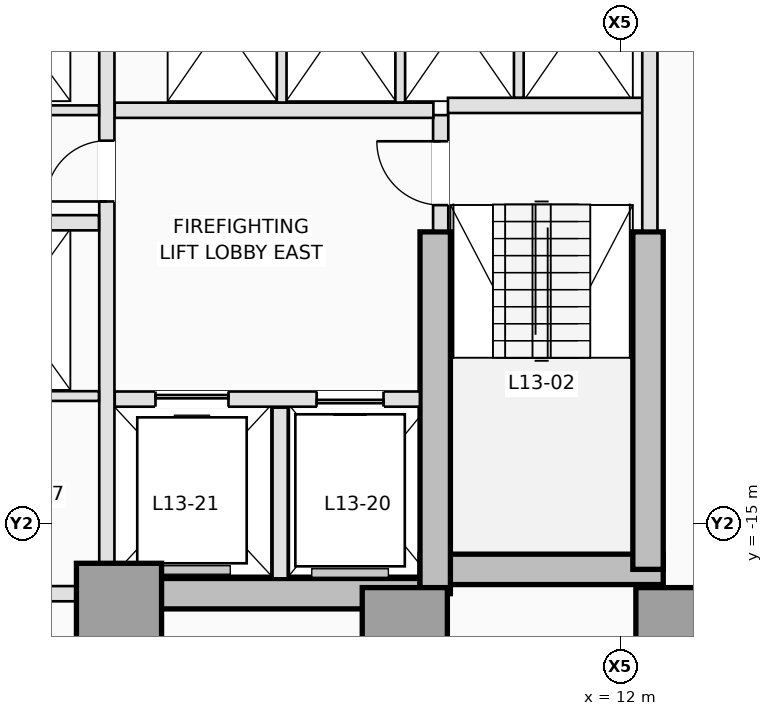
"""IFC4 building model, lengths in metres.
Left out: names, types, materials, properties, quantities, classifications, styles, units other than length and angle.
Written with IfcOpenShell. Run it as: python <this file> out.ifc"""

import sys

from ifc_helpers import new_model, si_unit, direction, frame, frame_2d, origin, origin_2d, place, context, subcontext, project, spatial, rectangle, extrude, element, fill, save


model = new_model("IFC4")
c1 = context("Model", 3, precision=1e-05, world=origin(), true_north=direction((0.0, 1.0)))
c2 = subcontext(c1, "Body", "Model", "MODEL_VIEW")
j1 = project(units=[si_unit("LENGTHUNIT", "METRE"), si_unit("PLANEANGLEUNIT", "RADIAN")], contexts=[c1])
p1 = place(None, origin())
s1 = spatial("IfcSite", under=j1, at=p1, CompositionType="ELEMENT")
p2 = place(p1, origin())
s2 = spatial("IfcBuilding", under=s1, at=p2, CompositionType="ELEMENT")
p3 = place(p2, frame((0.0, 0.0, 52.1)))
s3 = spatial("IfcBuildingStorey", under=s2, at=p3, CompositionType="ELEMENT", Elevation=52.1)
p4 = place(p3, frame((3.75, -16.15, 0.0), z_axis=(0.0, 0.0, 1.0), x_axis=(1.0, 0.0, 0.0)))
e1 = element("IfcWall", 1, at=p4, inside=s3, PredefinedType="SHEAR", context=c2, shape_type="SweptSolid", body=[
    extrude(rectangle(XDim=5.2, YDim=0.5, at=frame_2d((2.6, 0.0))), origin(), (0.0, 0.0, 1.0), 3.5),
])
p5 = place(p3, frame((8.7, -15.75, 0.0), z_axis=(0.0, 0.0, 1.0), x_axis=(1.0, 0.0, 0.0)))
e2 = element("IfcWall", 2, at=p5, inside=s3, PredefinedType="SHEAR", context=c2, shape_type="SweptSolid", body=[
    extrude(rectangle(XDim=4.0, YDim=0.5, at=frame_2d((2.0, 0.0))), origin(), (0.0, 0.0, 1.0), 3.5),
])
p6 = place(p3, frame((12.45, -15.75, 0.0), z_axis=(0.0, 0.0, 1.0), x_axis=(0.0, 1.0, 0.0)))
e3 = element("IfcWall", 3, at=p6, inside=s3, PredefinedType="SHEAR", context=c2, shape_type="SweptSolid", body=[
    extrude(rectangle(XDim=5.55, YDim=0.5, at=frame_2d((2.775, 0.0))), origin(), (0.0, 0.0, 1.0), 3.5),
])
p7 = place(p3, frame((8.95, -16.15, 0.0), z_axis=(0.0, 0.0, 1.0), x_axis=(0.0, 1.0, 0.0)))
e4 = element("IfcWall", 4, at=p7, inside=s3, PredefinedType="SHEAR", context=c2, shape_type="SweptSolid", body=[
    extrude(rectangle(XDim=5.95, YDim=0.5, at=frame_2d((2.975, 0.0))), origin(), (0.0, 0.0, 1.0), 3.5),
])
for number, where, z_axis, x_axis in (
    (5, (3.75, -16.35, 0.0), (0.0, 0.0, 1.0), (1.0, 0.0, 0.0)),
    (6, (8.45, -16.75, 0.0), (0.0, 0.0, 1.0), (1.0, 0.0, 0.0)),
    (7, (12.95, -16.75, 0.0), (0.0, 0.0, 1.0), (1.0, 0.0, 0.0)),
):
    element("IfcColumn", number, at=place(p3, frame(where, z_axis=z_axis, x_axis=x_axis)), inside=s3, PredefinedType="COLUMN", context=c2, shape_type="SweptSolid", body=[
        extrude(rectangle(XDim=1.4, YDim=1.4, at=origin_2d()), origin(), (0.0, 0.0, 1.0), 3.5),
    ])
p8 = place(p3, frame((9.04, -10.18, 0.0), z_axis=(0.0, 0.0, 1.0), x_axis=(0.0, 1.0, 0.0)))
e8 = element("IfcWall", 8, at=p8, inside=s3, PredefinedType="PARTITIONING", context=c2, shape_type="SweptSolid", body=[
    extrude(rectangle(XDim=1.9, YDim=0.25, at=frame_2d((0.95, 0.0))), origin(), (0.0, 0.0, 1.0), 3.25),
])
p9 = place(p8, frame((0.42, 0.0, 0.0)))
e9 = element("IfcOpeningElement", 9, at=p9, cuts=e8, PredefinedType="OPENING", context=c2, shape_type="SweptSolid", body=[
    extrude(rectangle(XDim=1.05, YDim=2.15, at=frame_2d((0.525, 1.075))), frame((0.0, 0.135, 0.0), z_axis=(0.0, -1.0, 0.0), x_axis=(1.0, 0.0, 0.0)), (0.0, 0.0, 1.0), 0.27),
])
p10 = place(p3, frame((9.16, -8.12, 0.0), z_axis=(0.0, 0.0, 1.0), x_axis=(1.0, 0.0, 0.0)))
e10 = element("IfcWall", 10, at=p10, inside=s3, PredefinedType="PARTITIONING", context=c2, shape_type="SweptSolid", body=[
    extrude(rectangle(XDim=3.22, YDim=0.25, at=frame_2d((1.61, 0.0))), origin(), (0.0, 0.0, 1.0), 3.25),
])
p11 = place(p3, frame((12.48, -10.18, 0.0), z_axis=(0.0, 0.0, 1.0), x_axis=(0.0, 1.0, 0.0)))
e11 = element("IfcWall", 11, at=p11, inside=s3, PredefinedType="PARTITIONING", context=c2, shape_type="SweptSolid", body=[
    extrude(rectangle(XDim=4.678, YDim=0.25, at=frame_2d((2.339, 0.0))), origin(), (0.0, 0.0, 1.0), 3.25),
])
p12 = place(p3, frame((3.68, -12.95, 0.0), z_axis=(0.0, 0.0, 1.0), x_axis=(1.0, 0.0, 0.0)))
e12 = element("IfcWall", 12, at=p12, inside=s3, PredefinedType="PARTITIONING", context=c2, shape_type="SweptSolid", body=[
    extrude(rectangle(XDim=5.018, YDim=0.25, at=frame_2d((2.509, 0.0))), origin(), (0.0, 0.0, 1.0), 3.25),
])
p13 = place(p12, frame((3.32, 0.0, 0.0)))
e13 = element("IfcOpeningElement", 13, at=p13, cuts=e12, PredefinedType="OPENING", context=c2, shape_type="SweptSolid", body=[
    extrude(rectangle(XDim=1.1, YDim=2.15, at=frame_2d((0.55, 1.075))), frame((0.0, 0.135, 0.0), z_axis=(0.0, -1.0, 0.0), x_axis=(1.0, 0.0, 0.0)), (0.0, 0.0, 1.0), 0.27),
])
p14 = place(p12, frame((0.67, 0.0, 0.0)))
e14 = element("IfcOpeningElement", 14, at=p14, cuts=e12, PredefinedType="OPENING", context=c2, shape_type="SweptSolid", body=[
    extrude(rectangle(XDim=1.2, YDim=2.15, at=frame_2d((0.6, 1.075))), frame((0.0, 0.135, 0.0), z_axis=(0.0, -1.0, 0.0), x_axis=(1.0, 0.0, 0.0)), (0.0, 0.0, 1.0), 0.27),
])
p15 = place(p3, frame((6.4, -15.898, 0.0), z_axis=(0.0, 0.0, 1.0), x_axis=(0.0, 1.0, 0.0)))
e15 = element("IfcWall", 15, at=p15, inside=s3, PredefinedType="PARTITIONING", context=c2, shape_type="SweptSolid", body=[
    extrude(rectangle(XDim=2.808, YDim=0.25, at=frame_2d((1.404, 0.0))), origin(), (0.0, 0.0, 1.0), 3.25),
])
p16 = place(p3, frame((3.68, -8.2, 0.0), z_axis=(0.0, 0.0, 1.0), x_axis=(1.0, 0.0, 0.0)))
e16 = element("IfcWall", 16, at=p16, inside=s3, PredefinedType="PARTITIONING", context=c2, shape_type="SweptSolid", body=[
    extrude(rectangle(XDim=5.24, YDim=0.25, at=frame_2d((2.62, 0.0))), origin(), (0.0, 0.0, 1.0), 3.25),
])
p17 = place(p3, frame((3.55, -15.648, 0.0), z_axis=(0.0, 0.0, 1.0), x_axis=(0.0, 1.0, 0.0)))
e17 = element("IfcWall", 17, at=p17, inside=s3, PredefinedType="PARTITIONING", context=c2, shape_type="SweptSolid", body=[
    extrude(rectangle(XDim=10.146, YDim=0.25, at=frame_2d((5.073, 0.0))), origin(), (0.0, 0.0, 1.0), 3.25),
])
p18 = place(p17, frame((5.948, 0.0, 0.0)))
e18 = element("IfcOpeningElement", 18, at=p18, cuts=e17, PredefinedType="OPENING", context=c2, shape_type="SweptSolid", body=[
    extrude(rectangle(XDim=1.0, YDim=2.15, at=frame_2d((0.5, 1.075))), frame((0.0, 0.135, 0.0), z_axis=(0.0, -1.0, 0.0), x_axis=(1.0, 0.0, 0.0)), (0.0, 0.0, 1.0), 0.27),
])
for number, where, z_axis, x_axis in (
    (19, (6.425, -8.073, 0.0), (0.0, 0.0, 1.0), (0.0, 1.0, 0.0)),
    (20, (8.375, -8.073, 0.0), (0.0, 0.0, 1.0), (0.0, 1.0, 0.0)),
):
    element("IfcWall", number, at=place(p3, frame(where, z_axis=z_axis, x_axis=x_axis)), inside=s3, PredefinedType="PARTITIONING", context=c2, shape_type="SweptSolid", body=[
        extrude(rectangle(XDim=2.733, YDim=0.16, at=frame_2d((1.366, 0.0))), origin(), (0.0, 0.0, 1.0), 3.25),
    ])
p19 = place(p3, frame((10.325, -7.993, 0.0), z_axis=(0.0, 0.0, 1.0), x_axis=(0.0, 1.0, 0.0)))
e21 = element("IfcWall", 21, at=p19, inside=s3, PredefinedType="PARTITIONING", context=c2, shape_type="SweptSolid", body=[
    extrude(rectangle(XDim=2.653, YDim=0.16, at=frame_2d((1.326, 0.0))), origin(), (0.0, 0.0, 1.0), 3.25),
])
p20 = place(p3, frame((-3.048, -16.15, 0.0), z_axis=(0.0, 0.0, 1.0), x_axis=(1.0, 0.0, 0.0)))
e22 = element("IfcWall", 22, at=p20, inside=s3, PredefinedType="PARTITIONING", context=c2, shape_type="SweptSolid", body=[
    extrude(rectangle(XDim=6.096, YDim=0.25, at=frame_2d((3.048, 0.0))), origin(), (0.0, 0.0, 1.0), 2.3),
])
p21 = place(p3, frame((0.95, -8.2, 0.0), z_axis=(0.0, 0.0, 1.0), x_axis=(1.0, 0.0, 0.0)))
e23 = element("IfcWall", 23, at=p21, inside=s3, PredefinedType="PARTITIONING", context=c2, shape_type="SweptSolid", body=[
    extrude(rectangle(XDim=2.47, YDim=0.16, at=frame_2d((1.235, 0.0))), origin(), (0.0, 0.0, 1.0), 3.25),
])
p22 = place(p3, frame((0.95, -10.05, 0.0), z_axis=(0.0, 0.0, 1.0), x_axis=(1.0, 0.0, 0.0)))
e24 = element("IfcWall", 24, at=p22, inside=s3, PredefinedType="PARTITIONING", context=c2, shape_type="SweptSolid", body=[
    extrude(rectangle(XDim=2.47, YDim=0.25, at=frame_2d((1.235, 0.0))), origin(), (0.0, 0.0, 1.0), 3.25),
])
p23 = place(p3, frame((-3.42, -12.9, 0.0), z_axis=(0.0, 0.0, 1.0), x_axis=(1.0, 0.0, 0.0)))
e25 = element("IfcWall", 25, at=p23, inside=s3, PredefinedType="PARTITIONING", context=c2, shape_type="SweptSolid", body=[
    extrude(rectangle(XDim=6.84, YDim=0.16, at=frame_2d((3.42, 0.0))), origin(), (0.0, 0.0, 1.0), 3.25),
])
p24 = place(p23, frame((2.98, 0.0, 0.0)))
e26 = element("IfcOpeningElement", 26, at=p24, cuts=e25, PredefinedType="OPENING", context=c2, shape_type="SweptSolid", body=[
    extrude(rectangle(XDim=0.88, YDim=2.12, at=frame_2d((0.44, 1.06))), frame((0.0, 0.09, 0.0), z_axis=(0.0, -1.0, 0.0), x_axis=(1.0, 0.0, 0.0)), (0.0, 0.0, 1.0), 0.18),
])
p25 = place(p13, origin())
e27 = element("IfcDoor", 27, at=p25, inside=s3, OperationType="SLIDING_TO_RIGHT", PredefinedType="DOOR", context=c2, shape_type="SweptSolid", body=[
    extrude(rectangle(XDim=1.1, YDim=2.15, at=frame_2d((0.55, 1.075))), frame((0.0, 0.025, 0.0), z_axis=(0.0, -1.0, 0.0), x_axis=(1.0, 0.0, 0.0)), (0.0, 0.0, 1.0), 0.05),
])
fill(e13, e27)
p26 = place(p14, origin())
e28 = element("IfcDoor", 28, at=p26, inside=s3, OperationType="SLIDING_TO_LEFT", PredefinedType="DOOR", context=c2, shape_type="SweptSolid", body=[
    extrude(rectangle(XDim=1.2, YDim=2.15, at=frame_2d((0.6, 1.075))), frame((0.0, 0.025, 0.0), z_axis=(0.0, -1.0, 0.0), x_axis=(1.0, 0.0, 0.0)), (0.0, 0.0, 1.0), 0.05),
])
fill(e14, e28)
p27 = place(p9, origin())
e29 = element("IfcDoor", 29, at=p27, inside=s3, OperationType="SINGLE_SWING_RIGHT", PredefinedType="DOOR", context=c2, shape_type="SweptSolid", body=[
    extrude(rectangle(XDim=1.05, YDim=2.15, at=frame_2d((0.525, 1.075))), frame((0.0, 0.025, 0.0), z_axis=(0.0, -1.0, 0.0), x_axis=(1.0, 0.0, 0.0)), (0.0, 0.0, 1.0), 0.05),
])
fill(e9, e29)
p28 = place(p18, origin())
e30 = element("IfcDoor", 30, at=p28, inside=s3, OperationType="SINGLE_SWING_LEFT", PredefinedType="DOOR", context=c2, shape_type="SweptSolid", body=[
    extrude(rectangle(XDim=1.0, YDim=2.15, at=frame_2d((0.5, 1.075))), frame((0.0, 0.025, 0.0), z_axis=(0.0, -1.0, 0.0), x_axis=(1.0, 0.0, 0.0)), (0.0, 0.0, 1.0), 0.05),
])
fill(e18, e30)
save(model, sys.argv[1])
